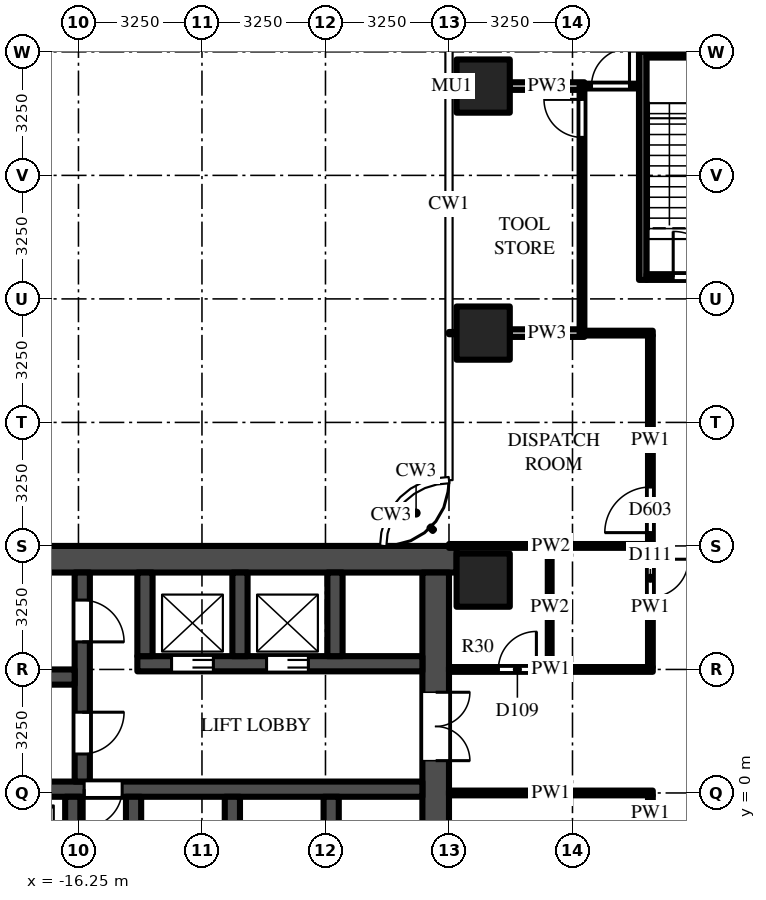
"""IFC4 building model, lengths in metres.
Left out: names, types, materials, properties, quantities, classifications, styles, units other than length and angle.
Written with IfcOpenShell. Run it as: python <this file> out.ifc"""

import sys

from ifc_helpers import new_model, si_unit, direction, frame, frame_2d, origin, origin_2d, place, context, subcontext, project, spatial, rectangle, extrude, source, transform, mapped, element, fill, save


model = new_model("IFC4")
c1 = context("Model", 3, precision=1e-05, world=origin(), true_north=direction((0.0, 1.0)))
c2 = subcontext(c1, "Body", "Model", "MODEL_VIEW")
j1 = project(units=[si_unit("LENGTHUNIT", "METRE"), si_unit("PLANEANGLEUNIT", "RADIAN")], contexts=[c1])
p1 = place(None, origin())
s1 = spatial("IfcSite", under=j1, at=p1, CompositionType="ELEMENT")
p2 = place(p1, origin())
s2 = spatial("IfcBuilding", under=s1, at=p2, CompositionType="ELEMENT")
p3 = place(p2, frame((0.0, 0.0, 61.0)))
s3 = spatial("IfcBuildingStorey", under=s2, at=p3, CompositionType="ELEMENT", Elevation=61.0)
m1 = source(origin(), c2, "Body", "SweptSolid", [
    extrude(rectangle(XDim=1.4, YDim=1.4, at=origin_2d()), origin(), (0.0, 0.0, 1.0), 4.5),
])
for number, where, z_axis, x_axis in (
    (1, (-5.6, 12.1, 0.0), (0.0, 0.0, 1.0), (1.0, 0.0, 0.0)),
    (2, (-5.6, 18.6, 0.0), (0.0, 0.0, 1.0), (1.0, 0.0, 0.0)),
    (3, (-5.6, 5.6, 0.0), (0.0, 0.0, 1.0), (1.0, 0.0, 0.0)),
):
    element("IfcColumn", number, at=place(p3, frame(where, z_axis=z_axis, x_axis=x_axis)), inside=s3, PredefinedType="COLUMN", context=c2, shape_type="MappedRepresentation", body=[
        mapped(m1, transform((0.0, 0.0, 0.0))),
    ])
m2 = source(origin(), c2, "Body", "SweptSolid", [
    extrude(rectangle(XDim=16.45, YDim=0.7, at=frame_2d((8.225, 0.0))), origin(), (0.0, 0.0, 1.0), 4.25),
])
p4 = place(p3, frame((-6.3, 6.15, 0.0), z_axis=(0.0, 0.0, 1.0), x_axis=(-1.0, 0.0, 0.0)))
e4 = element("IfcWall", 4, at=p4, inside=s3, PredefinedType="SHEAR", context=c2, shape_type="MappedRepresentation", body=[
    mapped(m2, transform((0.0, 0.0, 0.0))),
])
m3 = source(origin(), c2, "Body", "SweptSolid", [
    extrude(rectangle(XDim=9.05, YDim=0.7, at=frame_2d((4.525, 0.0))), origin(), (0.0, 0.0, 1.0), 4.25),
])
p5 = place(p3, frame((-6.85, 5.8, 0.0), z_axis=(0.0, 0.0, 1.0), x_axis=(0.0, -1.0, 0.0)))
e5 = element("IfcWall", 5, at=p5, inside=s3, PredefinedType="SHEAR", context=c2, shape_type="MappedRepresentation", body=[
    mapped(m3, transform((0.0, 0.0, 0.0))),
])
m4 = source(origin(), c2, "Body", "SweptSolid", [
    extrude(rectangle(XDim=1.8, YDim=2.1, at=frame_2d((0.9, 1.05))), frame((0.0, 0.36, 0.0), z_axis=(0.0, -1.0, 0.0), x_axis=(1.0, 0.0, 0.0)), (0.0, 0.0, 1.0), 0.72),
])
p6 = place(p5, frame((3.15, 0.0, 0.0)))
e6 = element("IfcOpeningElement", 6, at=p6, cuts=e5, PredefinedType="OPENING", context=c2, shape_type="MappedRepresentation", body=[
    mapped(m4, transform((0.0, 0.0, 0.0))),
])
m5 = source(origin(), c2, "Body", "SweptSolid", [
    extrude(rectangle(XDim=7.5, YDim=0.4, at=frame_2d((3.75, 0.0))), origin(), (0.0, 0.0, 1.0), 4.25),
])
p7 = place(p3, frame((-7.2, 3.4, 0.0), z_axis=(0.0, 0.0, 1.0), x_axis=(-1.0, 0.0, 0.0)))
e7 = element("IfcWall", 7, at=p7, inside=s3, PredefinedType="SHEAR", context=c2, shape_type="MappedRepresentation", body=[
    mapped(m5, transform((0.0, 0.0, 0.0))),
])
m6 = source(origin(), c2, "Body", "SweptSolid", [
    extrude(rectangle(XDim=1.1, YDim=2.1, at=frame_2d((0.55, 1.05))), frame((0.0, 0.21, 0.0), z_axis=(0.0, -1.0, 0.0), x_axis=(1.0, 0.0, 0.0)), (0.0, 0.0, 1.0), 0.42),
])
p8 = place(p7, frame((3.0, 0.0, 0.0)))
e8 = element("IfcOpeningElement", 8, at=p8, cuts=e7, PredefinedType="OPENING", context=c2, shape_type="MappedRepresentation", body=[
    mapped(m6, transform((0.0, 0.0, 0.0))),
])
p9 = place(p7, frame((5.5, 0.0, 0.0)))
e9 = element("IfcOpeningElement", 9, at=p9, cuts=e7, PredefinedType="OPENING", context=c2, shape_type="MappedRepresentation", body=[
    mapped(m6, transform((0.0, 0.0, 0.0))),
])
m7 = source(origin(), c2, "Body", "SweptSolid", [
    extrude(rectangle(XDim=14.85, YDim=0.4, at=frame_2d((7.425, 0.0))), origin(), (0.0, 0.0, 1.0), 4.25),
])
p10 = place(p3, frame((-7.2, 0.1, 0.0), z_axis=(0.0, 0.0, 1.0), x_axis=(-1.0, 0.0, 0.0)))
e10 = element("IfcWall", 10, at=p10, inside=s3, PredefinedType="SHEAR", context=c2, shape_type="MappedRepresentation", body=[
    mapped(m7, transform((0.0, 0.0, 0.0))),
])
m8 = source(origin(), c2, "Body", "SweptSolid", [
    extrude(rectangle(XDim=1.0, YDim=2.1, at=frame_2d((0.5, 1.05))), frame((0.0, 0.21, 0.0), z_axis=(0.0, -1.0, 0.0), x_axis=(1.0, 0.0, 0.0)), (0.0, 0.0, 1.0), 0.42),
])
p11 = place(p10, frame((7.9, 0.0, 0.0)))
e11 = element("IfcOpeningElement", 11, at=p11, cuts=e10, PredefinedType="OPENING", context=c2, shape_type="MappedRepresentation", body=[
    mapped(m8, transform((0.0, 0.0, 0.0))),
])
m9 = source(origin(), c2, "Body", "SweptSolid", [
    extrude(rectangle(XDim=5.5, YDim=0.4, at=frame_2d((2.75, 0.0))), origin(), (0.0, 0.0, 1.0), 4.25),
])
p12 = place(p3, frame((-16.15, 5.8, 0.0), z_axis=(0.0, 0.0, 1.0), x_axis=(0.0, -1.0, 0.0)))
e12 = element("IfcWall", 12, at=p12, inside=s3, PredefinedType="SHEAR", context=c2, shape_type="MappedRepresentation", body=[
    mapped(m9, transform((0.0, 0.0, 0.0))),
])
p13 = place(p12, frame((0.725, 0.0, 0.0)))
e13 = element("IfcOpeningElement", 13, at=p13, cuts=e12, PredefinedType="OPENING", context=c2, shape_type="MappedRepresentation", body=[
    mapped(m6, transform((0.0, 0.0, 0.0))),
])
p14 = place(p12, frame((3.675, 0.0, 0.0)))
e14 = element("IfcOpeningElement", 14, at=p14, cuts=e12, PredefinedType="OPENING", context=c2, shape_type="MappedRepresentation", body=[
    mapped(m6, transform((0.0, 0.0, 0.0))),
])
m10 = source(origin(), c2, "Body", "SweptSolid", [
    extrude(rectangle(XDim=5.7, YDim=0.4, at=frame_2d((2.85, 0.0))), origin(), (0.0, 0.0, 1.0), 4.25),
])
p15 = place(p3, frame((-16.35, 3.05, 0.0), z_axis=(0.0, 0.0, 1.0), x_axis=(-1.0, 0.0, 0.0)))
e15 = element("IfcWall", 15, at=p15, inside=s3, PredefinedType="SHEAR", context=c2, shape_type="MappedRepresentation", body=[
    mapped(m10, transform((0.0, 0.0, 0.0))),
])
m11 = source(origin(), c2, "Body", "SweptSolid", [
    extrude(rectangle(XDim=2.2, YDim=0.4, at=frame_2d((1.1, 0.0))), origin(), (0.0, 0.0, 1.0), 4.25),
])
for number, where, z_axis, x_axis in (
    (16, (-9.5, 5.8, 0.0), (0.0, 0.0, 1.0), (0.0, -1.0, 0.0)),
    (17, (-12.0, 5.8, 0.0), (0.0, 0.0, 1.0), (0.0, -1.0, 0.0)),
    (18, (-14.5, 5.8, 0.0), (0.0, 0.0, 1.0), (0.0, -1.0, 0.0)),
):
    element("IfcWall", number, at=place(p3, frame(where, z_axis=z_axis, x_axis=x_axis)), inside=s3, PredefinedType="SHEAR", context=c2, shape_type="MappedRepresentation", body=[
        mapped(m11, transform((0.0, 0.0, 0.0))),
    ])
m12 = source(origin(), c2, "Body", "SweptSolid", [
    extrude(rectangle(XDim=2.45, YDim=0.4, at=frame_2d((1.225, 0.0))), origin(), (0.0, 0.0, 1.0), 4.25),
])
for number, where, z_axis, x_axis in (
    (19, (-9.6, -0.1, 0.0), (0.0, 0.0, 1.0), (0.0, -1.0, 0.0)),
    (20, (-12.2, -0.1, 0.0), (0.0, 0.0, 1.0), (0.0, -1.0, 0.0)),
    (21, (-14.8, -0.1, 0.0), (0.0, 0.0, 1.0), (0.0, -1.0, 0.0)),
    (22, (-16.4, -0.1, 0.0), (0.0, 0.0, 1.0), (0.0, -1.0, 0.0)),
):
    element("IfcWall", number, at=place(p3, frame(where, z_axis=z_axis, x_axis=x_axis)), inside=s3, PredefinedType="SHEAR", context=c2, shape_type="MappedRepresentation", body=[
        mapped(m12, transform((0.0, 0.0, 0.0))),
    ])
m13 = source(origin(), c2, "Body", "SweptSolid", [
    extrude(rectangle(XDim=6.0, YDim=0.2, at=frame_2d((3.0, 0.0))), origin(), (0.0, 0.0, 1.0), 4.25),
])
p16 = place(p3, frame((-1.4, 13.5, 0.0), z_axis=(0.0, 0.0, 1.0), x_axis=(0.0, 1.0, 0.0)))
e23 = element("IfcWall", 23, at=p16, inside=s3, PredefinedType="SHEAR", context=c2, shape_type="MappedRepresentation", body=[
    mapped(m13, transform((0.0, 0.0, 0.0))),
])
m14 = source(origin(), c2, "Body", "SweptSolid", [
    extrude(rectangle(XDim=2.6, YDim=0.15, at=frame_2d((1.3, 0.0))), origin(), (0.0, 0.0, 1.0), 4.25),
])
p17 = place(p3, frame((-1.3, 13.575, 0.0), z_axis=(0.0, 0.0, 1.0), x_axis=(1.0, 0.0, 0.0)))
e24 = element("IfcWall", 24, at=p17, inside=s3, PredefinedType="SHEAR", context=c2, shape_type="MappedRepresentation", body=[
    mapped(m14, transform((0.0, 0.0, 0.0))),
])
m15 = source(origin(), c2, "Body", "SweptSolid", [
    extrude(rectangle(XDim=1.2, YDim=2.1, at=frame_2d((0.6, 1.05))), frame((0.0, 0.085, 0.0), z_axis=(0.0, -1.0, 0.0), x_axis=(1.0, 0.0, 0.0)), (0.0, 0.0, 1.0), 0.17),
])
p18 = place(p17, frame((0.7, 0.0, 0.0)))
e25 = element("IfcOpeningElement", 25, at=p18, cuts=e24, PredefinedType="OPENING", context=c2, shape_type="MappedRepresentation", body=[
    mapped(m15, transform((0.0, 0.0, 0.0))),
])
p19 = place(p3, frame((-1.3, 19.425, 0.0), z_axis=(0.0, 0.0, 1.0), x_axis=(1.0, 0.0, 0.0)))
e26 = element("IfcWall", 26, at=p19, inside=s3, PredefinedType="SHEAR", context=c2, shape_type="MappedRepresentation", body=[
    mapped(m14, transform((0.0, 0.0, 0.0))),
])
m16 = source(origin(), c2, "Body", "SweptSolid", [
    extrude(rectangle(XDim=3.137, YDim=0.1, at=frame_2d((1.569, 0.0))), origin(), (0.0, 0.0, 1.0), 3.468),
])
p20 = place(p3, frame((-3.85, 3.312, 0.0), z_axis=(0.0, 0.0, 1.0), x_axis=(0.0, 1.0, 0.0)))
e27 = element("IfcWall", 27, at=p20, inside=s3, PredefinedType="PARTITIONING", context=c2, shape_type="MappedRepresentation", body=[
    mapped(m16, transform((0.0, 0.0, 0.0))),
])
m17 = source(origin(), c2, "Body", "SweptSolid", [
    extrude(rectangle(XDim=6.3, YDim=0.125, at=frame_2d((3.15, 0.0))), origin(), (0.0, 0.0, 1.0), 3.468),
])
p21 = place(p3, frame((-3.0, 12.2, 0.0), z_axis=(0.0, 0.0, 1.0), x_axis=(0.0, 1.0, 0.0)))
e28 = element("IfcWall", 28, at=p21, inside=s3, PredefinedType="PARTITIONING", context=c2, shape_type="MappedRepresentation", body=[
    mapped(m17, transform((0.0, 0.0, 0.0))),
])
m18 = source(origin(), c2, "Body", "SweptSolid", [
    extrude(rectangle(XDim=1.0, YDim=2.1, at=frame_2d((0.5, 1.05))), frame((0.0, 0.073, 0.0), z_axis=(0.0, -1.0, 0.0), x_axis=(1.0, 0.0, 0.0)), (0.0, 0.0, 1.0), 0.145),
])
p22 = place(p21, frame((5.05, 0.0, 0.0)))
e29 = element("IfcOpeningElement", 29, at=p22, cuts=e28, PredefinedType="OPENING", context=c2, shape_type="MappedRepresentation", body=[
    mapped(m18, transform((0.0, 0.0, 0.0))),
])
m19 = source(origin(), c2, "Body", "SweptSolid", [
    extrude(rectangle(XDim=3.125, YDim=0.125, at=frame_2d((1.562, 0.0))), origin(), (0.0, 0.0, 1.0), 3.546),
])
p23 = place(p3, frame((-1.2, -0.062, 0.0), z_axis=(0.0, 0.0, 1.0), x_axis=(0.0, -1.0, 0.0)))
e30 = element("IfcWall", 30, at=p23, inside=s3, PredefinedType="PARTITIONING", context=c2, shape_type="MappedRepresentation", body=[
    mapped(m19, transform((0.0, 0.0, 0.0))),
])
m20 = source(origin(), c2, "Body", "SweptSolid", [
    extrude(rectangle(XDim=3.137, YDim=0.125, at=frame_2d((1.569, 0.0))), origin(), (0.0, 0.0, 1.0), 3.468),
])
p24 = place(p3, frame((-1.2, 6.45, 0.0), z_axis=(0.0, 0.0, 1.0), x_axis=(0.0, -1.0, 0.0)))
e31 = element("IfcWall", 31, at=p24, inside=s3, PredefinedType="PARTITIONING", context=c2, shape_type="MappedRepresentation", body=[
    mapped(m20, transform((0.0, 0.0, 0.0))),
])
p25 = place(p24, frame((0.3, 0.0, 0.0)))
e32 = element("IfcOpeningElement", 32, at=p25, cuts=e31, PredefinedType="OPENING", context=c2, shape_type="MappedRepresentation", body=[
    mapped(m18, transform((0.0, 0.0, 0.0))),
])
m21 = source(origin(), c2, "Body", "SweptSolid", [
    extrude(rectangle(XDim=5.488, YDim=0.125, at=frame_2d((2.744, 0.0))), origin(), (0.0, 0.0, 1.0), 3.468),
])
p26 = place(p3, frame((-1.2, 6.55, 0.0), z_axis=(0.0, 0.0, 1.0), x_axis=(0.0, 1.0, 0.0)))
e33 = element("IfcWall", 33, at=p26, inside=s3, PredefinedType="PARTITIONING", context=c2, shape_type="MappedRepresentation", body=[
    mapped(m21, transform((0.0, 0.0, 0.0))),
])
m22 = source(origin(), c2, "Body", "SweptSolid", [
    extrude(rectangle(XDim=1.2, YDim=2.1, at=frame_2d((0.6, 1.05))), frame((0.0, 0.073, 0.0), z_axis=(0.0, -1.0, 0.0), x_axis=(1.0, 0.0, 0.0)), (0.0, 0.0, 1.0), 0.145),
])
p27 = place(p26, frame((0.3, 0.0, 0.0)))
e34 = element("IfcOpeningElement", 34, at=p27, cuts=e33, PredefinedType="OPENING", context=c2, shape_type="MappedRepresentation", body=[
    mapped(m22, transform((0.0, 0.0, 0.0))),
])
m23 = source(origin(), c2, "Body", "SweptSolid", [
    extrude(rectangle(XDim=5.363, YDim=0.125, at=frame_2d((2.681, 0.0))), origin(), (0.0, 0.0, 1.0), 3.468),
])
p28 = place(p3, frame((-1.137, 0.0, 0.0), z_axis=(0.0, 0.0, 1.0), x_axis=(-1.0, 0.0, 0.0)))
e35 = element("IfcWall", 35, at=p28, inside=s3, PredefinedType="PARTITIONING", context=c2, shape_type="MappedRepresentation", body=[
    mapped(m23, transform((0.0, 0.0, 0.0))),
])
p29 = place(p3, frame((-6.5, 3.25, 0.0), z_axis=(0.0, 0.0, 1.0), x_axis=(1.0, 0.0, 0.0)))
e36 = element("IfcWall", 36, at=p29, inside=s3, PredefinedType="PARTITIONING", context=c2, shape_type="MappedRepresentation", body=[
    mapped(m23, transform((0.0, 0.0, 0.0))),
])
p30 = place(p29, frame((1.3, 0.0, 0.0)))
e37 = element("IfcOpeningElement", 37, at=p30, cuts=e36, PredefinedType="OPENING", context=c2, shape_type="MappedRepresentation", body=[
    mapped(m18, transform((0.0, 0.0, 0.0))),
])
m24 = source(origin(), c2, "Body", "SweptSolid", [
    extrude(rectangle(XDim=5.363, YDim=0.1, at=frame_2d((2.681, 0.0))), origin(), (0.0, 0.0, 1.0), 3.33),
])
p31 = place(p3, frame((-6.5, 6.5, 0.0), z_axis=(0.0, 0.0, 1.0), x_axis=(1.0, 0.0, 0.0)))
e38 = element("IfcWall", 38, at=p31, inside=s3, PredefinedType="PARTITIONING", context=c2, shape_type="MappedRepresentation", body=[
    mapped(m24, transform((0.0, 0.0, 0.0))),
])
m25 = source(origin(), c2, "Body", "SweptSolid", [
    extrude(rectangle(XDim=1.962, YDim=0.2, at=frame_2d((0.981, 0.0))), origin(), (0.0, 0.0, 1.0), 3.468),
])
p32 = place(p3, frame((-4.9, 12.1, 0.0), z_axis=(0.0, 0.0, 1.0), x_axis=(1.0, 0.0, 0.0)))
e39 = element("IfcWall", 39, at=p32, inside=s3, PredefinedType="PARTITIONING", context=c2, shape_type="MappedRepresentation", body=[
    mapped(m25, transform((0.0, 0.0, 0.0))),
])
m26 = source(origin(), c2, "Body", "SweptSolid", [
    extrude(rectangle(XDim=1.925, YDim=0.125, at=frame_2d((0.962, 0.0))), origin(), (0.0, 0.0, 1.0), 3.468),
])
p33 = place(p3, frame((-1.137, 12.1, 0.0), z_axis=(0.0, 0.0, 1.0), x_axis=(-1.0, 0.0, 0.0)))
e40 = element("IfcWall", 40, at=p33, inside=s3, PredefinedType="PARTITIONING", context=c2, shape_type="MappedRepresentation", body=[
    mapped(m26, transform((0.0, 0.0, 0.0))),
])
m27 = source(origin(), c2, "Body", "SweptSolid", [
    extrude(rectangle(XDim=1.962, YDim=0.2, at=frame_2d((0.981, 0.0))), origin(), (0.0, 0.0, 1.0), 3.697),
])
p34 = place(p3, frame((-4.9, 18.6, 0.0), z_axis=(0.0, 0.0, 1.0), x_axis=(1.0, 0.0, 0.0)))
e41 = element("IfcWall", 41, at=p34, inside=s3, PredefinedType="PARTITIONING", context=c2, shape_type="MappedRepresentation", body=[
    mapped(m27, transform((0.0, 0.0, 0.0))),
])
m28 = source(origin(), c2, "Body", "SweptSolid", [
    extrude(rectangle(XDim=1.562, YDim=0.125, at=frame_2d((0.781, 0.0))), origin(), (0.0, 0.0, 1.0), 3.697),
])
p35 = place(p3, frame((-3.062, 18.6, 0.0), z_axis=(0.0, 0.0, 1.0), x_axis=(1.0, 0.0, 0.0)))
e42 = element("IfcWall", 42, at=p35, inside=s3, PredefinedType="PARTITIONING", context=c2, shape_type="MappedRepresentation", body=[
    mapped(m28, transform((0.0, 0.0, 0.0))),
])
p36 = place(p35, frame((0.312, 0.0, 0.0)))
e43 = element("IfcOpeningElement", 43, at=p36, cuts=e42, PredefinedType="OPENING", context=c2, shape_type="MappedRepresentation", body=[
    mapped(m18, transform((0.0, 0.0, 0.0))),
])
m29 = source(origin(), c2, "Body", "SweptSolid", [
    extrude(rectangle(XDim=1.1, YDim=2.1, at=frame_2d((0.55, 1.05))), frame((0.0, 0.025, 0.0), z_axis=(0.0, -1.0, 0.0), x_axis=(1.0, 0.0, 0.0)), (0.0, 0.0, 1.0), 0.05),
])
p37 = place(p8, origin())
e44 = element("IfcDoor", 44, at=p37, inside=s3, OperationType="DOUBLE_DOOR_SLIDING", PredefinedType="DOOR", context=c2, shape_type="MappedRepresentation", body=[
    mapped(m29, transform((0.0, 0.0, 0.0))),
])
fill(e8, e44)
p38 = place(p9, origin())
e45 = element("IfcDoor", 45, at=p38, inside=s3, OperationType="DOUBLE_DOOR_SLIDING", PredefinedType="DOOR", context=c2, shape_type="MappedRepresentation", body=[
    mapped(m29, transform((0.0, 0.0, 0.0))),
])
fill(e9, e45)
m30 = source(origin(), c2, "Body", "SweptSolid", [
    extrude(rectangle(XDim=1.8, YDim=2.1, at=frame_2d((0.9, 1.05))), frame((0.0, -0.275, 0.0), z_axis=(0.0, -1.0, 0.0), x_axis=(1.0, 0.0, 0.0)), (0.0, 0.0, 1.0), 0.05),
])
p39 = place(p6, origin())
e46 = element("IfcDoor", 46, at=p39, inside=s3, OperationType="DOUBLE_DOOR_SINGLE_SWING", PredefinedType="DOOR", context=c2, shape_type="MappedRepresentation", body=[
    mapped(m30, transform((0.0, 0.0, 0.0))),
])
fill(e6, e46)
p40 = place(p13, origin())
e47 = element("IfcDoor", 47, at=p40, inside=s3, OperationType="SINGLE_SWING_RIGHT", PredefinedType="DOOR", context=c2, shape_type="MappedRepresentation", body=[
    mapped(m29, transform((0.0, 0.0, 0.0))),
])
fill(e13, e47)
p41 = place(p14, origin())
e48 = element("IfcDoor", 48, at=p41, inside=s3, OperationType="SINGLE_SWING_LEFT", PredefinedType="DOOR", context=c2, shape_type="MappedRepresentation", body=[
    mapped(m29, transform((0.0, 0.0, 0.0))),
])
fill(e14, e48)
m31 = source(origin(), c2, "Body", "SweptSolid", [
    extrude(rectangle(XDim=1.0, YDim=2.1, at=frame_2d((0.5, 1.05))), frame((0.0, 0.025, 0.0), z_axis=(0.0, -1.0, 0.0), x_axis=(1.0, 0.0, 0.0)), (0.0, 0.0, 1.0), 0.05),
])
p42 = place(p11, origin())
e49 = element("IfcDoor", 49, at=p42, inside=s3, OperationType="SINGLE_SWING_RIGHT", PredefinedType="DOOR", context=c2, shape_type="MappedRepresentation", body=[
    mapped(m31, transform((0.0, 0.0, 0.0))),
])
fill(e11, e49)
m32 = source(origin(), c2, "Body", "SweptSolid", [
    extrude(rectangle(XDim=1.2, YDim=2.1, at=frame_2d((0.6, 1.05))), frame((0.0, 0.025, 0.0), z_axis=(0.0, -1.0, 0.0), x_axis=(1.0, 0.0, 0.0)), (0.0, 0.0, 1.0), 0.05),
])
p43 = place(p18, origin())
e50 = element("IfcDoor", 50, at=p43, inside=s3, OperationType="SINGLE_SWING_LEFT", PredefinedType="DOOR", context=c2, shape_type="MappedRepresentation", body=[
    mapped(m32, transform((0.0, 0.0, 0.0))),
])
fill(e25, e50)
p44 = place(p30, origin())
e51 = element("IfcDoor", 51, at=p44, inside=s3, OperationType="SINGLE_SWING_RIGHT", PredefinedType="DOOR", context=c2, shape_type="MappedRepresentation", body=[
    mapped(m31, transform((0.0, 0.0, 0.0))),
])
fill(e37, e51)
p45 = place(p25, origin())
e52 = element("IfcDoor", 52, at=p45, inside=s3, OperationType="SINGLE_SWING_LEFT", PredefinedType="DOOR", context=c2, shape_type="MappedRepresentation", body=[
    mapped(m31, transform((0.0, 0.0, 0.0))),
])
fill(e32, e52)
p46 = place(p27, origin())
e53 = element("IfcDoor", 53, at=p46, inside=s3, OperationType="SINGLE_SWING_LEFT", PredefinedType="DOOR", context=c2, shape_type="MappedRepresentation", body=[
    mapped(m32, transform((0.0, 0.0, 0.0))),
])
fill(e34, e53)
p47 = place(p22, origin())
e54 = element("IfcDoor", 54, at=p47, inside=s3, OperationType="SINGLE_SWING_RIGHT", PredefinedType="DOOR", context=c2, shape_type="MappedRepresentation", body=[
    mapped(m31, transform((0.0, 0.0, 0.0))),
])
fill(e29, e54)
p48 = place(p36, origin())
e55 = element("IfcDoor", 55, at=p48, inside=s3, OperationType="SINGLE_SWING_RIGHT", PredefinedType="DOOR", context=c2, shape_type="MappedRepresentation", body=[
    mapped(m31, transform((0.0, 0.0, 0.0))),
])
fill(e43, e55)
save(model, sys.argv[1])
